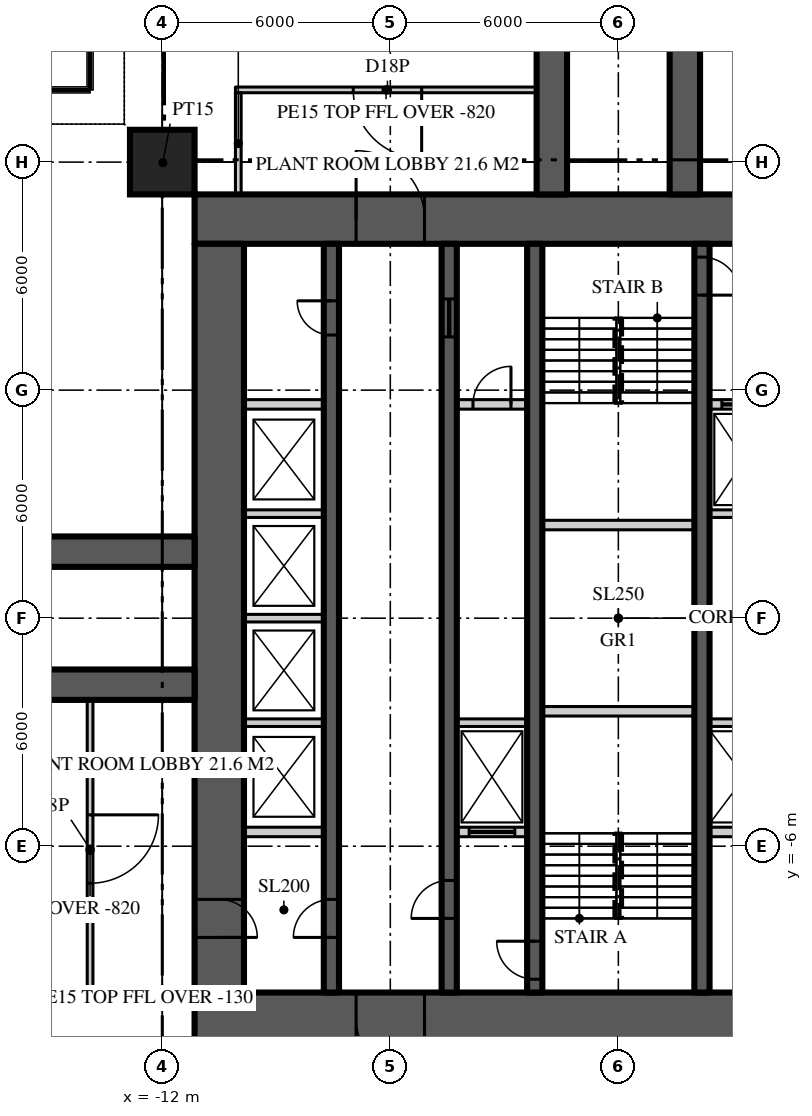
"""IFC4 building model, lengths in metres.
Left out: names, types, materials, properties, quantities, classifications, styles, units other than length and angle.
Written with IfcOpenShell. Run it as: python <this file> out.ifc"""

import sys

from ifc_helpers import new_model, si_unit, direction, frame, frame_2d, origin, origin_2d, place, context, subcontext, project, spatial, rectangle, extrude, element, fill, save


model = new_model("IFC4")
c1 = context("Model", 3, precision=1e-05, world=origin(), true_north=direction((0.0, 1.0)))
c2 = subcontext(c1, "Body", "Model", "MODEL_VIEW")
j1 = project(units=[si_unit("LENGTHUNIT", "METRE"), si_unit("PLANEANGLEUNIT", "RADIAN")], contexts=[c1])
p1 = place(None, origin())
s1 = spatial("IfcSite", under=j1, at=p1, CompositionType="ELEMENT")
p2 = place(p1, origin())
s2 = spatial("IfcBuilding", under=s1, at=p2, CompositionType="ELEMENT")
p3 = place(p2, frame((0.0, 0.0, 37.5)))
s3 = spatial("IfcBuildingStorey", under=s2, at=p3, CompositionType="ELEMENT", Elevation=37.5)
p4 = place(p3, frame((-11.15, 10.5, 0.0), z_axis=(0.0, 0.0, 1.0), x_axis=(1.0, 0.0, 0.0)))
e1 = element("IfcWall", 1, at=p4, inside=s3, PredefinedType="SHEAR", context=c2, shape_type="SweptSolid", body=[
    extrude(rectangle(XDim=22.3, YDim=1.3, at=frame_2d((11.15, 0.0))), origin(), (0.0, 0.0, 1.0), 6.0),
])
p5 = place(p4, frame((4.25, 0.0, 0.0)))
e2 = element("IfcOpeningElement", 2, at=p5, cuts=e1, PredefinedType="OPENING", context=c2, shape_type="SweptSolid", body=[
    extrude(rectangle(XDim=1.8, YDim=2.2, at=frame_2d((0.9, 1.1))), frame((0.0, 0.66, 0.0), z_axis=(0.0, -1.0, 0.0), x_axis=(1.0, 0.0, 0.0)), (0.0, 0.0, 1.0), 1.32),
])
p6 = place(p4, frame((16.25, 0.0, 0.0)))
e3 = element("IfcOpeningElement", 3, at=p6, cuts=e1, PredefinedType="OPENING", context=c2, shape_type="SweptSolid", body=[
    extrude(rectangle(XDim=1.8, YDim=2.2, at=frame_2d((0.9, 1.1))), frame((0.0, 0.66, 0.0), z_axis=(0.0, -1.0, 0.0), x_axis=(1.0, 0.0, 0.0)), (0.0, 0.0, 1.0), 1.32),
])
p7 = place(p3, frame((11.15, -10.5, 0.0), z_axis=(0.0, 0.0, 1.0), x_axis=(-1.0, 0.0, 0.0)))
e4 = element("IfcWall", 4, at=p7, inside=s3, PredefinedType="SHEAR", context=c2, shape_type="SweptSolid", body=[
    extrude(rectangle(XDim=22.3, YDim=1.3, at=frame_2d((11.15, 0.0))), origin(), (0.0, 0.0, 1.0), 6.0),
])
p8 = place(p7, frame((16.25, 0.0, 0.0)))
e5 = element("IfcOpeningElement", 5, at=p8, cuts=e4, PredefinedType="OPENING", context=c2, shape_type="SweptSolid", body=[
    extrude(rectangle(XDim=1.8, YDim=2.2, at=frame_2d((0.9, 1.1))), frame((0.0, 0.66, 0.0), z_axis=(0.0, -1.0, 0.0), x_axis=(1.0, 0.0, 0.0)), (0.0, 0.0, 1.0), 1.32),
])
p9 = place(p7, frame((4.25, 0.0, 0.0)))
e6 = element("IfcOpeningElement", 6, at=p9, cuts=e4, PredefinedType="OPENING", context=c2, shape_type="SweptSolid", body=[
    extrude(rectangle(XDim=1.8, YDim=2.2, at=frame_2d((0.9, 1.1))), frame((0.0, 0.66, 0.0), z_axis=(0.0, -1.0, 0.0), x_axis=(1.0, 0.0, 0.0)), (0.0, 0.0, 1.0), 1.32),
])
p10 = place(p3, frame((-10.5, 9.85, 0.0), z_axis=(0.0, 0.0, 1.0), x_axis=(0.0, -1.0, 0.0)))
e7 = element("IfcWall", 7, at=p10, inside=s3, PredefinedType="SHEAR", context=c2, shape_type="SweptSolid", body=[
    extrude(rectangle(XDim=19.7, YDim=1.3, at=frame_2d((9.85, 0.0))), origin(), (0.0, 0.0, 1.0), 6.0),
])
p11 = place(p10, frame((17.25, 0.0, 0.0)))
e8 = element("IfcOpeningElement", 8, at=p11, cuts=e7, PredefinedType="OPENING", context=c2, shape_type="SweptSolid", body=[
    extrude(rectangle(XDim=1.0, YDim=2.2, at=frame_2d((0.5, 1.1))), frame((0.0, 0.66, 0.0), z_axis=(0.0, -1.0, 0.0), x_axis=(1.0, 0.0, 0.0)), (0.0, 0.0, 1.0), 1.32),
])
for number, where, z_axis, x_axis in (
    (9, (1.75, 11.15, 0.0), (0.0, 0.0, 1.0), (0.0, 1.0, 0.0)),
    (10, (-1.75, 11.15, 0.0), (0.0, 0.0, 1.0), (0.0, 1.0, 0.0)),
    (11, (-11.15, 1.75, 0.0), (0.0, 0.0, 1.0), (-1.0, 0.0, 0.0)),
    (12, (-11.15, -1.75, 0.0), (0.0, 0.0, 1.0), (-1.0, 0.0, 0.0)),
):
    element("IfcWall", number, at=place(p3, frame(where, z_axis=z_axis, x_axis=x_axis)), inside=s3, PredefinedType="SHEAR", context=c2, shape_type="SweptSolid", body=[
        extrude(rectangle(XDim=7.625, YDim=0.8, at=frame_2d((3.812, 0.0))), origin(), (0.0, 0.0, 1.0), 6.0),
    ])
p12 = place(p3, frame((-12.0, 12.0, 0.0), z_axis=(0.0, 0.0, 1.0), x_axis=(1.0, 0.0, 0.0)))
e13 = element("IfcColumn", 13, at=p12, inside=s3, PredefinedType="COLUMN", context=c2, shape_type="SweptSolid", body=[
    extrude(rectangle(XDim=1.7, YDim=1.7, at=origin_2d()), origin(), (0.0, 0.0, 1.0), 6.0),
])
p13 = place(p3, frame((-7.55, -9.85, 0.0), z_axis=(0.0, 0.0, 1.0), x_axis=(0.0, 1.0, 0.0)))
e14 = element("IfcWall", 14, at=p13, inside=s3, PredefinedType="SHEAR", context=c2, shape_type="SweptSolid", body=[
    extrude(rectangle(XDim=19.7, YDim=0.4, at=frame_2d((9.85, 0.0))), origin(), (0.0, 0.0, 1.0), 6.0),
])
p14 = place(p13, frame((1.45, 0.0, 0.0)))
e15 = element("IfcOpeningElement", 15, at=p14, cuts=e14, PredefinedType="OPENING", context=c2, shape_type="SweptSolid", body=[
    extrude(rectangle(XDim=1.0, YDim=2.2, at=frame_2d((0.5, 1.1))), frame((0.0, 0.21, 0.0), z_axis=(0.0, -1.0, 0.0), x_axis=(1.0, 0.0, 0.0)), (0.0, 0.0, 1.0), 0.42),
])
p15 = place(p13, frame((17.3, 0.0, 0.0)))
e16 = element("IfcOpeningElement", 16, at=p15, cuts=e14, PredefinedType="OPENING", context=c2, shape_type="SweptSolid", body=[
    extrude(rectangle(XDim=0.9, YDim=2.1, at=frame_2d((0.45, 1.05))), frame((0.0, 0.21, 0.0), z_axis=(0.0, -1.0, 0.0), x_axis=(1.0, 0.0, 0.0)), (0.0, 0.0, 1.0), 0.42),
])
p16 = place(p3, frame((-4.45, -9.85, 0.0), z_axis=(0.0, 0.0, 1.0), x_axis=(0.0, 1.0, 0.0)))
e17 = element("IfcWall", 17, at=p16, inside=s3, PredefinedType="SHEAR", context=c2, shape_type="SweptSolid", body=[
    extrude(rectangle(XDim=19.7, YDim=0.4, at=frame_2d((9.85, 0.0))), origin(), (0.0, 0.0, 1.0), 6.0),
])
p17 = place(p16, frame((1.95, 0.0, 0.0)))
e18 = element("IfcOpeningElement", 18, at=p17, cuts=e17, PredefinedType="OPENING", context=c2, shape_type="SweptSolid", body=[
    extrude(rectangle(XDim=1.0, YDim=2.2, at=frame_2d((0.5, 1.1))), frame((0.0, 0.21, 0.0), z_axis=(0.0, -1.0, 0.0), x_axis=(1.0, 0.0, 0.0)), (0.0, 0.0, 1.0), 0.42),
])
p18 = place(p16, frame((17.25, 0.0, 0.0)))
e19 = element("IfcOpeningElement", 19, at=p18, cuts=e17, PredefinedType="OPENING", context=c2, shape_type="SweptSolid", body=[
    extrude(rectangle(XDim=1.0, YDim=2.1, at=frame_2d((0.5, 1.05))), frame((0.0, 0.21, 0.0), z_axis=(0.0, -1.0, 0.0), x_axis=(1.0, 0.0, 0.0)), (0.0, 0.0, 1.0), 0.42),
])
p19 = place(p3, frame((-2.2, -9.85, 0.0), z_axis=(0.0, 0.0, 1.0), x_axis=(0.0, 1.0, 0.0)))
e20 = element("IfcWall", 20, at=p19, inside=s3, PredefinedType="SHEAR", context=c2, shape_type="SweptSolid", body=[
    extrude(rectangle(XDim=19.7, YDim=0.4, at=frame_2d((9.85, 0.0))), origin(), (0.0, 0.0, 1.0), 6.0),
])
p20 = place(p19, frame((0.35, 0.0, 0.0)))
e21 = element("IfcOpeningElement", 21, at=p20, cuts=e20, PredefinedType="OPENING", context=c2, shape_type="SweptSolid", body=[
    extrude(rectangle(XDim=1.0, YDim=2.2, at=frame_2d((0.5, 1.1))), frame((0.0, 0.21, 0.0), z_axis=(0.0, -1.0, 0.0), x_axis=(1.0, 0.0, 0.0)), (0.0, 0.0, 1.0), 0.42),
])
p21 = place(p3, frame((2.2, 9.85, 0.0), z_axis=(0.0, 0.0, 1.0), x_axis=(0.0, -1.0, 0.0)))
e22 = element("IfcWall", 22, at=p21, inside=s3, PredefinedType="SHEAR", context=c2, shape_type="SweptSolid", body=[
    extrude(rectangle(XDim=19.7, YDim=0.4, at=frame_2d((9.85, 0.0))), origin(), (0.0, 0.0, 1.0), 6.0),
])
p22 = place(p21, frame((0.35, 0.0, 0.0)))
e23 = element("IfcOpeningElement", 23, at=p22, cuts=e22, PredefinedType="OPENING", context=c2, shape_type="SweptSolid", body=[
    extrude(rectangle(XDim=1.0, YDim=2.2, at=frame_2d((0.5, 1.1))), frame((0.0, 0.21, 0.0), z_axis=(0.0, -1.0, 0.0), x_axis=(1.0, 0.0, 0.0)), (0.0, 0.0, 1.0), 0.42),
])
p23 = place(p3, frame((-9.85, 5.625, 0.0), z_axis=(0.0, 0.0, 1.0), x_axis=(1.0, 0.0, 0.0)))
e24 = element("IfcWall", 24, at=p23, inside=s3, PredefinedType="SOLIDWALL", context=c2, shape_type="SweptSolid", body=[
    extrude(rectangle(XDim=2.1, YDim=0.25, at=frame_2d((1.05, 0.0))), origin(), (0.0, 0.0, 1.0), 5.8),
])
p24 = place(p3, frame((-4.25, 5.625, 0.0), z_axis=(0.0, 0.0, 1.0), x_axis=(1.0, 0.0, 0.0)))
e25 = element("IfcWall", 25, at=p24, inside=s3, PredefinedType="SOLIDWALL", context=c2, shape_type="SweptSolid", body=[
    extrude(rectangle(XDim=1.85, YDim=0.25, at=frame_2d((0.925, 0.0))), origin(), (0.0, 0.0, 1.0), 5.8),
])
p25 = place(p24, frame((0.425, 0.0, 0.0)))
e26 = element("IfcOpeningElement", 26, at=p25, cuts=e25, PredefinedType="OPENING", context=c2, shape_type="SweptSolid", body=[
    extrude(rectangle(XDim=1.0, YDim=2.2, at=frame_2d((0.5, 1.1))), frame((0.0, 0.135, 0.0), z_axis=(0.0, -1.0, 0.0), x_axis=(1.0, 0.0, 0.0)), (0.0, 0.0, 1.0), 0.27),
])
p26 = place(p3, frame((2.4, 5.625, 0.0), z_axis=(0.0, 0.0, 1.0), x_axis=(1.0, 0.0, 0.0)))
e27 = element("IfcWall", 27, at=p26, inside=s3, PredefinedType="SOLIDWALL", context=c2, shape_type="SweptSolid", body=[
    extrude(rectangle(XDim=1.85, YDim=0.25, at=frame_2d((0.925, 0.0))), origin(), (0.0, 0.0, 1.0), 5.8),
])
p27 = place(p26, frame((0.325, 0.0, 0.0)))
e28 = element("IfcOpeningElement", 28, at=p27, cuts=e27, PredefinedType="OPENING", context=c2, shape_type="SweptSolid", body=[
    extrude(rectangle(XDim=1.2, YDim=2.2, at=frame_2d((0.6, 1.1))), frame((0.0, 0.135, 0.0), z_axis=(0.0, -1.0, 0.0), x_axis=(1.0, 0.0, 0.0)), (0.0, 0.0, 1.0), 0.27),
])
p28 = place(p3, frame((-9.85, -5.625, 0.0), z_axis=(0.0, 0.0, 1.0), x_axis=(1.0, 0.0, 0.0)))
e29 = element("IfcWall", 29, at=p28, inside=s3, PredefinedType="SOLIDWALL", context=c2, shape_type="SweptSolid", body=[
    extrude(rectangle(XDim=2.1, YDim=0.25, at=frame_2d((1.05, 0.0))), origin(), (0.0, 0.0, 1.0), 5.8),
])
p29 = place(p3, frame((-4.25, -5.625, 0.0), z_axis=(0.0, 0.0, 1.0), x_axis=(1.0, 0.0, 0.0)))
e30 = element("IfcWall", 30, at=p29, inside=s3, PredefinedType="SOLIDWALL", context=c2, shape_type="SweptSolid", body=[
    extrude(rectangle(XDim=1.85, YDim=0.25, at=frame_2d((0.925, 0.0))), origin(), (0.0, 0.0, 1.0), 5.8),
])
p30 = place(p29, frame((0.325, 0.0, 0.0)))
e31 = element("IfcOpeningElement", 31, at=p30, cuts=e30, PredefinedType="OPENING", context=c2, shape_type="SweptSolid", body=[
    extrude(rectangle(XDim=1.2, YDim=2.2, at=frame_2d((0.6, 1.1))), frame((0.0, 0.135, 0.0), z_axis=(0.0, -1.0, 0.0), x_axis=(1.0, 0.0, 0.0)), (0.0, 0.0, 1.0), 0.27),
])
p31 = place(p3, frame((2.4, -5.625, 0.0), z_axis=(0.0, 0.0, 1.0), x_axis=(1.0, 0.0, 0.0)))
e32 = element("IfcWall", 32, at=p31, inside=s3, PredefinedType="SOLIDWALL", context=c2, shape_type="SweptSolid", body=[
    extrude(rectangle(XDim=1.85, YDim=0.25, at=frame_2d((0.925, 0.0))), origin(), (0.0, 0.0, 1.0), 5.8),
])
for number, where, z_axis, x_axis in (
    (33, (-2.0, -2.45, 0.0), (0.0, 0.0, 1.0), (1.0, 0.0, 0.0)),
    (34, (-2.0, 2.45, 0.0), (0.0, 0.0, 1.0), (1.0, 0.0, 0.0)),
):
    element("IfcWall", number, at=place(p3, frame(where, z_axis=z_axis, x_axis=x_axis)), inside=s3, PredefinedType="SOLIDWALL", context=c2, shape_type="SweptSolid", body=[
        extrude(rectangle(XDim=4.0, YDim=0.25, at=frame_2d((2.0, 0.0))), origin(), (0.0, 0.0, 1.0), 5.8),
    ])
p32 = place(p3, frame((-9.85, -2.75, 0.0), z_axis=(0.0, 0.0, 1.0), x_axis=(1.0, 0.0, 0.0)))
e35 = element("IfcWall", 35, at=p32, inside=s3, PredefinedType="SOLIDWALL", context=c2, shape_type="SweptSolid", body=[
    extrude(rectangle(XDim=2.1, YDim=0.2, at=frame_2d((1.05, 0.0))), origin(), (0.0, 0.0, 1.0), 5.8),
])
for number, where, z_axis, x_axis in (
    (36, (-4.25, -2.75, 0.0), (0.0, 0.0, 1.0), (1.0, 0.0, 0.0)),
    (37, (2.4, -2.75, 0.0), (0.0, 0.0, 1.0), (1.0, 0.0, 0.0)),
):
    element("IfcWall", number, at=place(p3, frame(where, z_axis=z_axis, x_axis=x_axis)), inside=s3, PredefinedType="SOLIDWALL", context=c2, shape_type="SweptSolid", body=[
        extrude(rectangle(XDim=1.85, YDim=0.2, at=frame_2d((0.925, 0.0))), origin(), (0.0, 0.0, 1.0), 5.8),
    ])
for number, where, z_axis, x_axis in (
    (38, (-9.85, 0.0, 0.0), (0.0, 0.0, 1.0), (1.0, 0.0, 0.0)),
    (39, (-9.85, 2.75, 0.0), (0.0, 0.0, 1.0), (1.0, 0.0, 0.0)),
):
    element("IfcWall", number, at=place(p3, frame(where, z_axis=z_axis, x_axis=x_axis)), inside=s3, PredefinedType="SOLIDWALL", context=c2, shape_type="SweptSolid", body=[
        extrude(rectangle(XDim=2.1, YDim=0.2, at=frame_2d((1.05, 0.0))), origin(), (0.0, 0.0, 1.0), 5.8),
    ])
p33 = place(p3, frame((2.4, 2.75, 0.0), z_axis=(0.0, 0.0, 1.0), x_axis=(1.0, 0.0, 0.0)))
e40 = element("IfcWall", 40, at=p33, inside=s3, PredefinedType="SOLIDWALL", context=c2, shape_type="SweptSolid", body=[
    extrude(rectangle(XDim=1.85, YDim=0.2, at=frame_2d((0.925, 0.0))), origin(), (0.0, 0.0, 1.0), 5.8),
])
p34 = place(p3, frame((-13.9, -2.15, 0.0), z_axis=(0.0, 0.0, 1.0), x_axis=(0.0, -1.0, 0.0)))
e41 = element("IfcWall", 41, at=p34, inside=s3, PredefinedType="SOLIDWALL", context=c2, shape_type="SweptSolid", body=[
    extrude(rectangle(XDim=7.925, YDim=0.15, at=frame_2d((3.962, 0.0))), origin(), (0.0, 0.0, 1.0), 5.18),
])
p35 = place(p34, frame((3.025, 0.0, 0.0)))
e42 = element("IfcOpeningElement", 42, at=p35, cuts=e41, PredefinedType="OPENING", context=c2, shape_type="SweptSolid", body=[
    extrude(rectangle(XDim=1.8, YDim=2.4, at=frame_2d((0.9, 1.2))), frame((0.0, 0.085, 0.0), z_axis=(0.0, -1.0, 0.0), x_axis=(1.0, 0.0, 0.0)), (0.0, 0.0, 1.0), 0.17),
])
p36 = place(p3, frame((-11.15, -10.0, 0.0), z_axis=(0.0, 0.0, 1.0), x_axis=(-1.0, 0.0, 0.0)))
e43 = element("IfcWall", 43, at=p36, inside=s3, PredefinedType="SOLIDWALL", context=c2, shape_type="SweptSolid", body=[
    extrude(rectangle(XDim=2.675, YDim=0.15, at=frame_2d((1.337, 0.0))), origin(), (0.0, 0.0, 1.0), 5.87),
])
p37 = place(p3, frame((-2.15, 13.9, 0.0), z_axis=(0.0, 0.0, 1.0), x_axis=(-1.0, 0.0, 0.0)))
e44 = element("IfcWall", 44, at=p37, inside=s3, PredefinedType="SOLIDWALL", context=c2, shape_type="SweptSolid", body=[
    extrude(rectangle(XDim=7.925, YDim=0.15, at=frame_2d((3.962, 0.0))), origin(), (0.0, 0.0, 1.0), 5.18),
])
p38 = place(p37, frame((3.025, 0.0, 0.0)))
e45 = element("IfcOpeningElement", 45, at=p38, cuts=e44, PredefinedType="OPENING", context=c2, shape_type="SweptSolid", body=[
    extrude(rectangle(XDim=1.8, YDim=2.4, at=frame_2d((0.9, 1.2))), frame((0.0, 0.085, 0.0), z_axis=(0.0, -1.0, 0.0), x_axis=(1.0, 0.0, 0.0)), (0.0, 0.0, 1.0), 0.17),
])
p39 = place(p3, frame((-10.0, 11.15, 0.0), z_axis=(0.0, 0.0, 1.0), x_axis=(0.0, 1.0, 0.0)))
e46 = element("IfcWall", 46, at=p39, inside=s3, PredefinedType="SOLIDWALL", context=c2, shape_type="SweptSolid", body=[
    extrude(rectangle(XDim=2.675, YDim=0.15, at=frame_2d((1.337, 0.0))), origin(), (0.0, 0.0, 1.0), 5.87),
])
p40 = place(p3, frame((-11.15, 11.15, 0.0), z_axis=(0.0, 0.0, 1.0), x_axis=(-0.707106781187, 0.707106781187, 0.0)))
e47 = element("IfcWall", 47, at=p40, inside=s3, PredefinedType="PARTITIONING", context=c2, shape_type="SweptSolid", body=[
    extrude(rectangle(XDim=2.362, YDim=0.15, at=frame_2d((1.181, 0.0))), origin(), (0.0, 0.0, 1.0), 5.32),
])
p41 = place(p5, origin())
e48 = element("IfcDoor", 48, at=p41, inside=s3, OperationType="DOUBLE_DOOR_DOUBLE_SWING", PredefinedType="DOOR", context=c2, shape_type="SweptSolid", body=[
    extrude(rectangle(XDim=1.8, YDim=2.2, at=frame_2d((0.9, 1.1))), frame((0.0, 0.025, 0.0), z_axis=(0.0, -1.0, 0.0), x_axis=(1.0, 0.0, 0.0)), (0.0, 0.0, 1.0), 0.05),
])
fill(e2, e48)
p42 = place(p8, origin())
e49 = element("IfcDoor", 49, at=p42, inside=s3, OperationType="DOUBLE_DOOR_DOUBLE_SWING", PredefinedType="DOOR", context=c2, shape_type="SweptSolid", body=[
    extrude(rectangle(XDim=1.8, YDim=2.2, at=frame_2d((0.9, 1.1))), frame((0.0, 0.025, 0.0), z_axis=(0.0, -1.0, 0.0), x_axis=(1.0, 0.0, 0.0)), (0.0, 0.0, 1.0), 0.05),
])
fill(e5, e49)
p43 = place(p14, origin())
e50 = element("IfcDoor", 50, at=p43, inside=s3, OperationType="SINGLE_SWING_LEFT", PredefinedType="DOOR", context=c2, shape_type="SweptSolid", body=[
    extrude(rectangle(XDim=1.0, YDim=2.2, at=frame_2d((0.5, 1.1))), frame((0.0, 0.025, 0.0), z_axis=(0.0, -1.0, 0.0), x_axis=(1.0, 0.0, 0.0)), (0.0, 0.0, 1.0), 0.05),
])
fill(e15, e50)
p44 = place(p11, origin())
e51 = element("IfcDoor", 51, at=p44, inside=s3, OperationType="SINGLE_SWING_RIGHT", PredefinedType="DOOR", context=c2, shape_type="SweptSolid", body=[
    extrude(rectangle(XDim=1.0, YDim=2.2, at=frame_2d((0.5, 1.1))), frame((0.0, 0.025, 0.0), z_axis=(0.0, -1.0, 0.0), x_axis=(1.0, 0.0, 0.0)), (0.0, 0.0, 1.0), 0.05),
])
fill(e8, e51)
p45 = place(p17, origin())
e52 = element("IfcDoor", 52, at=p45, inside=s3, OperationType="SINGLE_SWING_LEFT", PredefinedType="DOOR", context=c2, shape_type="SweptSolid", body=[
    extrude(rectangle(XDim=1.0, YDim=2.2, at=frame_2d((0.5, 1.1))), frame((0.0, 0.025, 0.0), z_axis=(0.0, -1.0, 0.0), x_axis=(1.0, 0.0, 0.0)), (0.0, 0.0, 1.0), 0.05),
])
fill(e18, e52)
p46 = place(p20, origin())
e53 = element("IfcDoor", 53, at=p46, inside=s3, OperationType="SINGLE_SWING_RIGHT", PredefinedType="DOOR", context=c2, shape_type="SweptSolid", body=[
    extrude(rectangle(XDim=1.0, YDim=2.2, at=frame_2d((0.5, 1.1))), frame((0.0, 0.025, 0.0), z_axis=(0.0, -1.0, 0.0), x_axis=(1.0, 0.0, 0.0)), (0.0, 0.0, 1.0), 0.05),
])
fill(e21, e53)
p47 = place(p22, origin())
e54 = element("IfcDoor", 54, at=p47, inside=s3, OperationType="SINGLE_SWING_RIGHT", PredefinedType="DOOR", context=c2, shape_type="SweptSolid", body=[
    extrude(rectangle(XDim=1.0, YDim=2.2, at=frame_2d((0.5, 1.1))), frame((0.0, 0.025, 0.0), z_axis=(0.0, -1.0, 0.0), x_axis=(1.0, 0.0, 0.0)), (0.0, 0.0, 1.0), 0.05),
])
fill(e23, e54)
p48 = place(p15, origin())
e55 = element("IfcDoor", 55, at=p48, inside=s3, OperationType="SINGLE_SWING_RIGHT", PredefinedType="DOOR", context=c2, shape_type="SweptSolid", body=[
    extrude(rectangle(XDim=0.9, YDim=2.1, at=frame_2d((0.45, 1.05))), frame((0.0, 0.025, 0.0), z_axis=(0.0, -1.0, 0.0), x_axis=(1.0, 0.0, 0.0)), (0.0, 0.0, 1.0), 0.05),
])
fill(e16, e55)
p49 = place(p18, origin())
e56 = element("IfcDoor", 56, at=p49, inside=s3, OperationType="SLIDING_TO_LEFT", PredefinedType="DOOR", context=c2, shape_type="SweptSolid", body=[
    extrude(rectangle(XDim=1.0, YDim=2.1, at=frame_2d((0.5, 1.05))), frame((0.0, 0.025, 0.0), z_axis=(0.0, -1.0, 0.0), x_axis=(1.0, 0.0, 0.0)), (0.0, 0.0, 1.0), 0.05),
])
fill(e19, e56)
p50 = place(p30, origin())
e57 = element("IfcDoor", 57, at=p50, inside=s3, OperationType="SLIDING_TO_LEFT", PredefinedType="DOOR", context=c2, shape_type="SweptSolid", body=[
    extrude(rectangle(XDim=1.2, YDim=2.2, at=frame_2d((0.6, 1.1))), frame((0.0, 0.025, 0.0), z_axis=(0.0, -1.0, 0.0), x_axis=(1.0, 0.0, 0.0)), (0.0, 0.0, 1.0), 0.05),
])
fill(e31, e57)
p51 = place(p27, origin())
e58 = element("IfcDoor", 58, at=p51, inside=s3, OperationType="SLIDING_TO_LEFT", PredefinedType="DOOR", context=c2, shape_type="SweptSolid", body=[
    extrude(rectangle(XDim=1.2, YDim=2.2, at=frame_2d((0.6, 1.1))), frame((0.0, 0.025, 0.0), z_axis=(0.0, -1.0, 0.0), x_axis=(1.0, 0.0, 0.0)), (0.0, 0.0, 1.0), 0.05),
])
fill(e28, e58)
p52 = place(p35, origin())
e59 = element("IfcDoor", 59, at=p52, inside=s3, OperationType="DOUBLE_DOOR_DOUBLE_SWING", PredefinedType="DOOR", context=c2, shape_type="SweptSolid", body=[
    extrude(rectangle(XDim=1.8, YDim=2.4, at=frame_2d((0.9, 1.2))), frame((0.0, 0.025, 0.0), z_axis=(0.0, -1.0, 0.0), x_axis=(1.0, 0.0, 0.0)), (0.0, 0.0, 1.0), 0.05),
])
fill(e42, e59)
p53 = place(p38, origin())
e60 = element("IfcDoor", 60, at=p53, inside=s3, OperationType="DOUBLE_DOOR_DOUBLE_SWING", PredefinedType="DOOR", context=c2, shape_type="SweptSolid", body=[
    extrude(rectangle(XDim=1.8, YDim=2.4, at=frame_2d((0.9, 1.2))), frame((0.0, 0.025, 0.0), z_axis=(0.0, -1.0, 0.0), x_axis=(1.0, 0.0, 0.0)), (0.0, 0.0, 1.0), 0.05),
])
fill(e45, e60)
p54 = place(p25, origin())
e61 = element("IfcDoor", 61, at=p54, inside=s3, OperationType="SINGLE_SWING_RIGHT", PredefinedType="DOOR", context=c2, shape_type="SweptSolid", body=[
    extrude(rectangle(XDim=1.0, YDim=2.2, at=frame_2d((0.5, 1.1))), frame((0.0, 0.025, 0.0), z_axis=(0.0, -1.0, 0.0), x_axis=(1.0, 0.0, 0.0)), (0.0, 0.0, 1.0), 0.05),
])
fill(e26, e61)
save(model, sys.argv[1])
